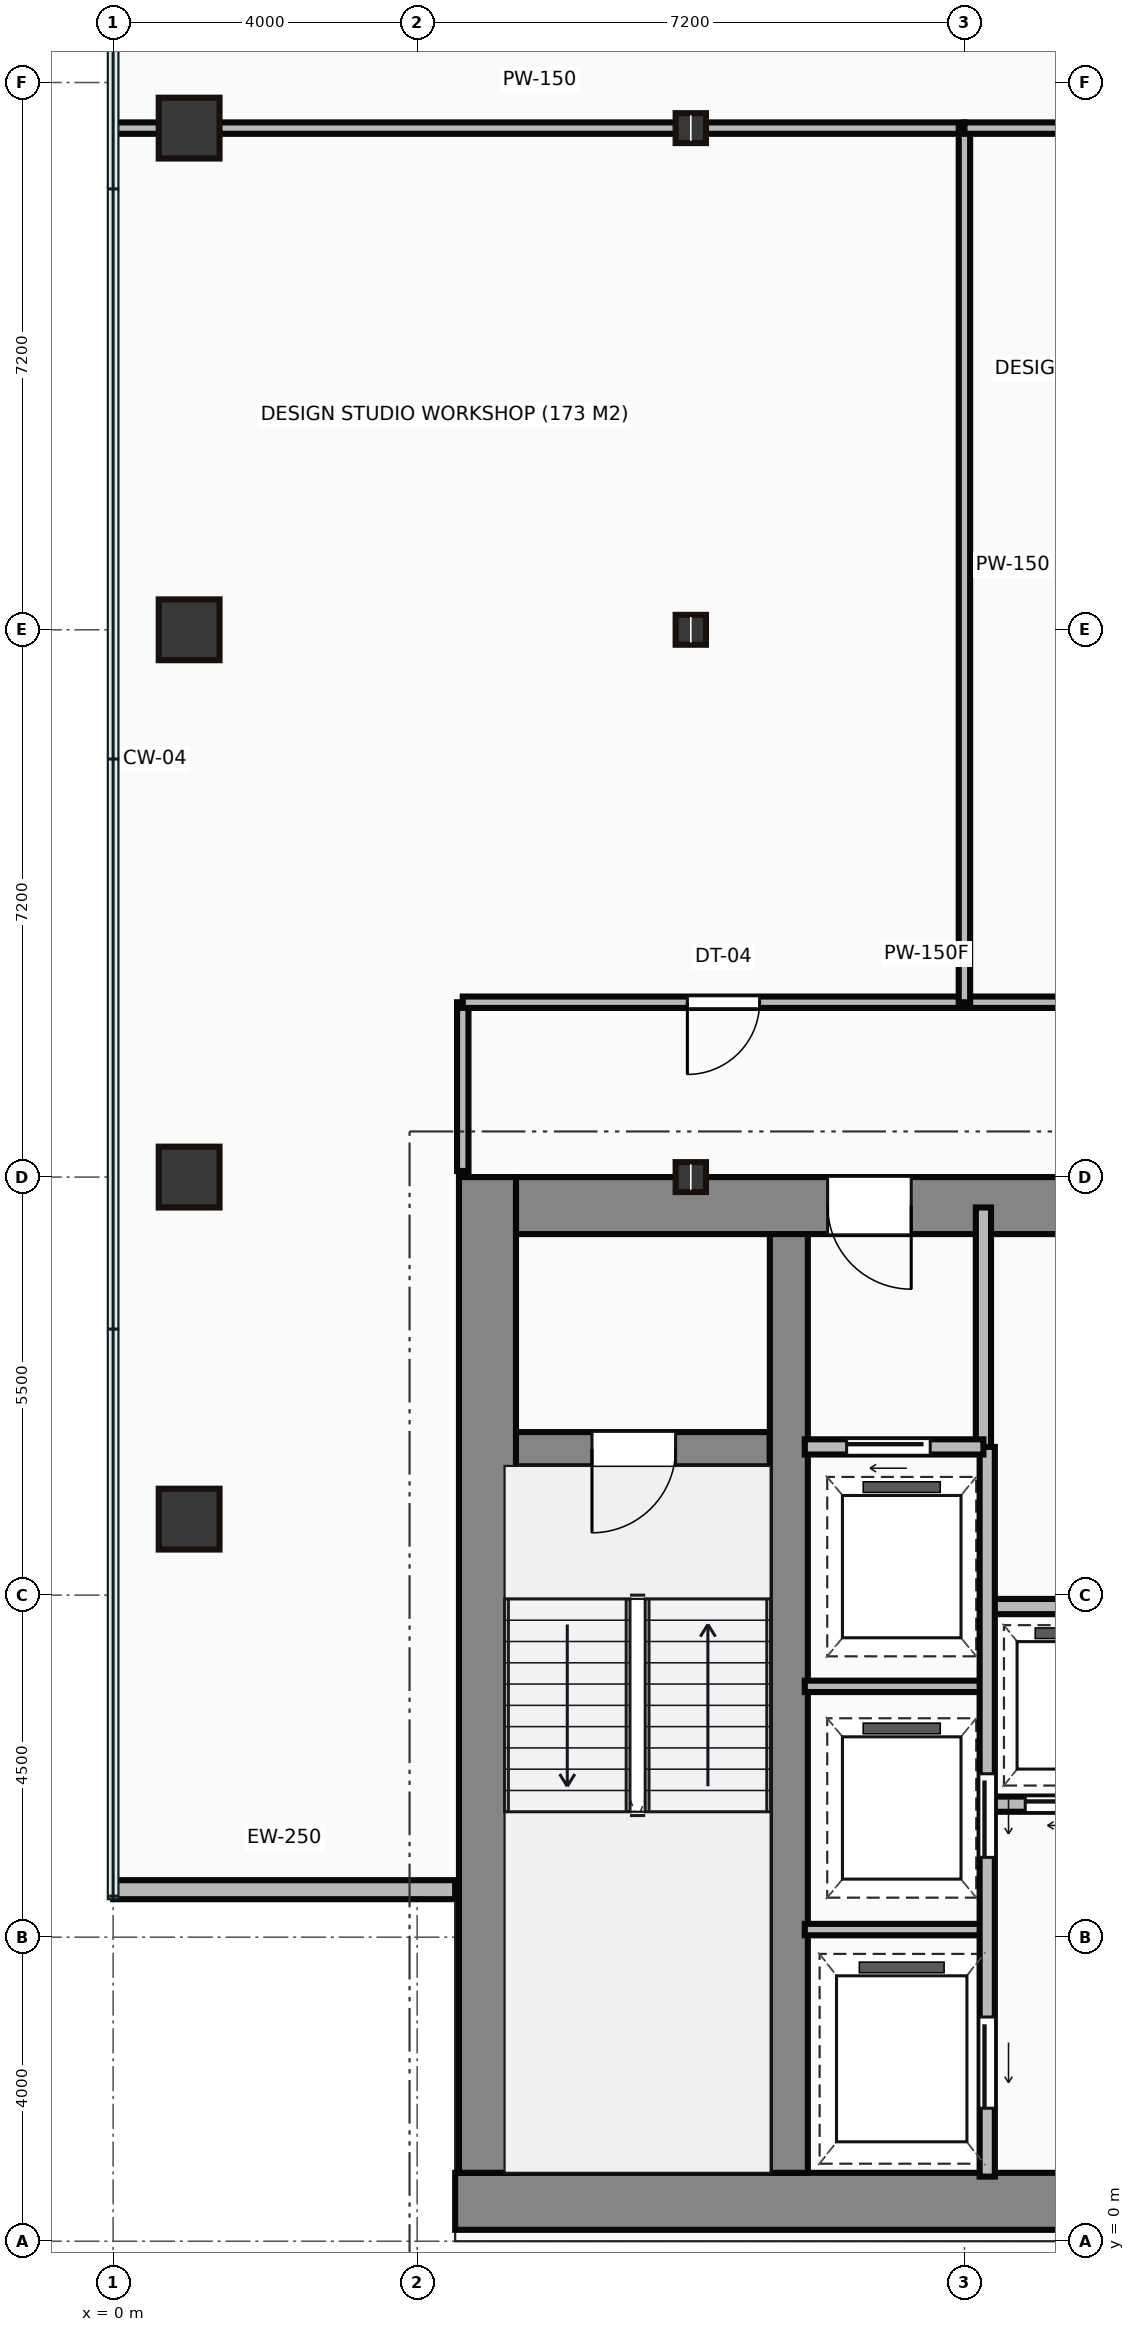
"""IFC4 building model, lengths in metres.
Left out: names, types, materials, properties, quantities, classifications, styles, units other than length and angle.
Written with IfcOpenShell. Run it as: python <this file> out.ifc"""

import sys

from ifc_helpers import new_model, si_unit, direction, frame, frame_2d, origin, origin_2d, place, context, subcontext, project, spatial, rectangle, hollow_rectangle, i_section, extrude, source, transform, mapped, element, fill, save


model = new_model("IFC4")
c1 = context("Model", 3, precision=1e-05, world=origin(), true_north=direction((0.0, 1.0)))
c2 = subcontext(c1, "Body", "Model", "MODEL_VIEW")
j1 = project(units=[si_unit("LENGTHUNIT", "METRE"), si_unit("PLANEANGLEUNIT", "RADIAN")], contexts=[c1])
p1 = place(None, origin())
s1 = spatial("IfcSite", under=j1, at=p1, CompositionType="ELEMENT")
p2 = place(p1, origin())
s2 = spatial("IfcBuilding", under=s1, at=p2, CompositionType="ELEMENT")
p3 = place(p2, frame((0.0, 0.0, 110.55)))
s3 = spatial("IfcBuildingStorey", under=s2, at=p3, CompositionType="ELEMENT", Elevation=110.55)
m1 = source(origin(), c2, "Body", "SweptSolid", [
    extrude(rectangle(XDim=29.5, YDim=0.75, at=frame_2d((14.75, 0.0))), origin(), (0.0, 0.0, 1.0), 3.65),
])
p4 = place(p3, frame((4.5, 0.525, 0.0), z_axis=(0.0, 0.0, 1.0), x_axis=(1.0, 0.0, 0.0)))
e1 = element("IfcWall", 1, at=p4, inside=s3, PredefinedType="SHEAR", context=c2, shape_type="MappedRepresentation", body=[
    mapped(m1, transform((0.0, 0.0, 0.0))),
])
m2 = source(origin(), c2, "Body", "SweptSolid", [
    extrude(rectangle(XDim=13.1, YDim=0.75, at=frame_2d((6.55, 0.0))), origin(), (0.0, 0.0, 1.0), 3.65),
])
p5 = place(p3, frame((4.925, 0.9, 0.0), z_axis=(0.0, 0.0, 1.0), x_axis=(0.0, 1.0, 0.0)))
e2 = element("IfcWall", 2, at=p5, inside=s3, PredefinedType="SHEAR", context=c2, shape_type="MappedRepresentation", body=[
    mapped(m2, transform((0.0, 0.0, 0.0))),
])
m3 = source(origin(), c2, "Body", "SweptSolid", [
    extrude(rectangle(XDim=9.1, YDim=0.75, at=frame_2d((4.55, 0.0))), origin(), (0.0, 0.0, 1.0), 3.65),
])
p6 = place(p3, frame((5.3, 13.625, 0.0), z_axis=(0.0, 0.0, 1.0), x_axis=(1.0, 0.0, 0.0)))
e3 = element("IfcWall", 3, at=p6, inside=s3, PredefinedType="SHEAR", context=c2, shape_type="MappedRepresentation", body=[
    mapped(m3, transform((0.0, 0.0, 0.0))),
])
p7 = place(p6, frame((4.1, 0.0, 0.0)))
e4 = element("IfcOpeningElement", 4, at=p7, cuts=e3, PredefinedType="OPENING", context=c2, shape_type="SweptSolid", body=[
    extrude(rectangle(XDim=1.1, YDim=2.15, at=frame_2d((0.55, 1.075))), frame((0.0, 0.385, 0.0), z_axis=(0.0, -1.0, 0.0), x_axis=(1.0, 0.0, 0.0)), (0.0, 0.0, 1.0), 0.77),
])
m4 = source(origin(), c2, "Body", "SweptSolid", [
    extrude(rectangle(XDim=12.35, YDim=0.5, at=frame_2d((6.175, 0.0))), origin(), (0.0, 0.0, 1.0), 3.65),
])
p8 = place(p3, frame((8.89, 0.9, 0.0), z_axis=(0.0, 0.0, 1.0), x_axis=(0.0, 1.0, 0.0)))
e5 = element("IfcWall", 5, at=p8, inside=s3, PredefinedType="SHEAR", context=c2, shape_type="MappedRepresentation", body=[
    mapped(m4, transform((0.0, 0.0, 0.0))),
])
m5 = source(origin(), c2, "Body", "SweptSolid", [
    extrude(rectangle(XDim=3.39, YDim=0.45, at=frame_2d((1.695, 0.0))), origin(), (0.0, 0.0, 1.0), 3.65),
])
p9 = place(p3, frame((5.25, 10.42, 0.0), z_axis=(0.0, 0.0, 1.0), x_axis=(1.0, 0.0, 0.0)))
e6 = element("IfcWall", 6, at=p9, inside=s3, PredefinedType="SHEAR", context=c2, shape_type="MappedRepresentation", body=[
    mapped(m5, transform((0.0, 0.0, 0.0))),
])
p10 = place(p9, frame((1.05, 0.0, 0.0)))
e7 = element("IfcOpeningElement", 7, at=p10, cuts=e6, PredefinedType="OPENING", context=c2, shape_type="SweptSolid", body=[
    extrude(rectangle(XDim=1.1, YDim=2.15, at=frame_2d((0.55, 1.075))), frame((0.0, 0.235, 0.0), z_axis=(0.0, -1.0, 0.0), x_axis=(1.0, 0.0, 0.0)), (0.0, 0.0, 1.0), 0.47),
])
m6 = source(origin(), c2, "Body", "SweptSolid", [
    extrude(hollow_rectangle(XDim=0.8, YDim=0.8, WallThickness=0.04, at=origin_2d()), origin(), (0.0, 0.0, 1.0), 3.65),
])
for number, where, z_axis, x_axis in (
    (8, (1.0, 9.5, 0.0), (0.0, 0.0, 1.0), (1.0, 0.0, 0.0)),
    (9, (1.0, 14.0, 0.0), (0.0, 0.0, 1.0), (1.0, 0.0, 0.0)),
    (10, (1.0, 21.2, 0.0), (0.0, 0.0, 1.0), (1.0, 0.0, 0.0)),
    (11, (1.0, 27.8, 0.0), (0.0, 0.0, 1.0), (1.0, 0.0, 0.0)),
):
    element("IfcColumn", number, at=place(p3, frame(where, z_axis=z_axis, x_axis=x_axis)), inside=s3, PredefinedType="COLUMN", context=c2, shape_type="MappedRepresentation", body=[
        mapped(m6, transform((0.0, 0.0, 0.0))),
    ])
m7 = source(origin(), c2, "Body", "SweptSolid", [
    extrude(i_section(OverallWidth=0.399, OverallDepth=0.393, WebThickness=0.023, FlangeThickness=0.037, at=origin_2d()), origin(), (0.0, 0.0, 1.0), 3.65),
])
for number, where, z_axis, x_axis in (
    (12, (7.6, 14.0, 0.0), (0.0, 0.0, 1.0), (1.0, 0.0, 0.0)),
    (13, (7.6, 21.2, 0.0), (0.0, 0.0, 1.0), (1.0, 0.0, 0.0)),
    (14, (7.6, 27.8, 0.0), (0.0, 0.0, 1.0), (1.0, 0.0, 0.0)),
):
    element("IfcColumn", number, at=place(p3, frame(where, z_axis=z_axis, x_axis=x_axis)), inside=s3, PredefinedType="COLUMN", context=c2, shape_type="MappedRepresentation", body=[
        mapped(m7, transform((0.0, 0.0, 0.0))),
    ])
m8 = source(origin(), c2, "Body", "SweptSolid", [
    extrude(rectangle(XDim=4.5, YDim=0.25, at=frame_2d((2.25, 0.0))), origin(), (0.0, 0.0, 1.0), 3.4),
])
p11 = place(p3, frame((0.0, 4.625, 0.0), z_axis=(0.0, 0.0, 1.0), x_axis=(1.0, 0.0, 0.0)))
e15 = element("IfcWall", 15, at=p11, inside=s3, PredefinedType="STANDARD", context=c2, shape_type="MappedRepresentation", body=[
    mapped(m8, transform((0.0, 0.0, 0.0))),
])
m9 = source(origin(), c2, "Body", "SweptSolid", [
    extrude(rectangle(XDim=3.18, YDim=0.2, at=frame_2d((1.59, 0.0))), origin(), (0.0, 0.0, 1.0), 3.4),
])
p12 = place(p3, frame((11.45, 10.42, 0.0), z_axis=(0.0, 0.0, 1.0), x_axis=(0.0, 1.0, 0.0)))
e16 = element("IfcWall", 16, at=p12, inside=s3, PredefinedType="PARTITIONING", context=c2, shape_type="MappedRepresentation", body=[
    mapped(m9, transform((0.0, 0.0, 0.0))),
])
m10 = source(origin(), c2, "Body", "SweptSolid", [
    extrude(rectangle(XDim=2.35, YDim=0.2, at=frame_2d((1.175, 0.0))), origin(), (0.0, 0.0, 1.0), 3.4),
])
p13 = place(p3, frame((9.1, 10.45, 0.0), z_axis=(0.0, 0.0, 1.0), x_axis=(1.0, 0.0, 0.0)))
e17 = element("IfcWall", 17, at=p13, inside=s3, PredefinedType="PARTITIONING", context=c2, shape_type="MappedRepresentation", body=[
    mapped(m10, transform((0.0, 0.0, 0.0))),
])
p14 = place(p13, frame((0.55, 0.0, 0.0)))
e18 = element("IfcOpeningElement", 18, at=p14, cuts=e17, PredefinedType="OPENING", context=c2, shape_type="SweptSolid", body=[
    extrude(rectangle(XDim=1.1, YDim=2.15, at=frame_2d((0.55, 1.075))), frame((0.0, 0.11, 0.0), z_axis=(0.0, -1.0, 0.0), x_axis=(1.0, 0.0, 0.0)), (0.0, 0.0, 1.0), 0.22),
])
m11 = source(origin(), c2, "Body", "SweptSolid", [
    extrude(rectangle(XDim=9.6, YDim=0.2, at=frame_2d((4.8, 0.0))), origin(), (0.0, 0.0, 1.0), 3.4),
])
p15 = place(p3, frame((11.5, 0.85, 0.0), z_axis=(0.0, 0.0, 1.0), x_axis=(0.0, 1.0, 0.0)))
e19 = element("IfcWall", 19, at=p15, inside=s3, PredefinedType="PARTITIONING", context=c2, shape_type="MappedRepresentation", body=[
    mapped(m11, transform((0.0, 0.0, 0.0))),
])
p16 = place(p15, frame((4.2, 0.0, 0.0)))
e20 = element("IfcOpeningElement", 20, at=p16, cuts=e19, PredefinedType="OPENING", context=c2, shape_type="SweptSolid", body=[
    extrude(rectangle(XDim=1.1, YDim=2.15, at=frame_2d((0.55, 1.075))), frame((0.0, 0.11, 0.0), z_axis=(0.0, -1.0, 0.0), x_axis=(1.0, 0.0, 0.0)), (0.0, 0.0, 1.0), 0.22),
])
p17 = place(p15, frame((0.9, 0.0, 0.0)))
e21 = element("IfcOpeningElement", 21, at=p17, cuts=e19, PredefinedType="OPENING", context=c2, shape_type="SweptSolid", body=[
    extrude(rectangle(XDim=1.2, YDim=2.15, at=frame_2d((0.6, 1.075))), frame((0.0, 0.11, 0.0), z_axis=(0.0, -1.0, 0.0), x_axis=(1.0, 0.0, 0.0)), (0.0, 0.0, 1.0), 0.22),
])
m12 = source(origin(), c2, "Body", "SweptSolid", [
    extrude(rectangle(XDim=2.4, YDim=0.15, at=frame_2d((1.2, 0.0))), origin(), (0.0, 0.0, 1.0), 3.4),
])
for number, where, z_axis, x_axis in (
    (22, (9.1, 4.1, 0.0), (0.0, 0.0, 1.0), (1.0, 0.0, 0.0)),
    (23, (9.1, 7.3, 0.0), (0.0, 0.0, 1.0), (1.0, 0.0, 0.0)),
):
    element("IfcWall", number, at=place(p3, frame(where, z_axis=z_axis, x_axis=x_axis)), inside=s3, PredefinedType="PARTITIONING", context=c2, shape_type="MappedRepresentation", body=[
        mapped(m12, transform((0.0, 0.0, 0.0))),
    ])
m13 = source(origin(), c2, "Body", "SweptSolid", [
    extrude(rectangle(XDim=11.85, YDim=0.2, at=frame_2d((5.925, 0.0))), origin(), (0.0, 0.0, 1.0), 3.4),
])
p18 = place(p3, frame((11.55, 5.75, 0.0), z_axis=(0.0, 0.0, 1.0), x_axis=(1.0, 0.0, 0.0)))
e24 = element("IfcWall", 24, at=p18, inside=s3, PredefinedType="PARTITIONING", context=c2, shape_type="MappedRepresentation", body=[
    mapped(m13, transform((0.0, 0.0, 0.0))),
])
p19 = place(p18, frame((0.45, 0.0, 0.0)))
e25 = element("IfcOpeningElement", 25, at=p19, cuts=e24, PredefinedType="OPENING", context=c2, shape_type="SweptSolid", body=[
    extrude(rectangle(XDim=1.05, YDim=2.15, at=frame_2d((0.525, 1.075))), frame((0.0, 0.11, 0.0), z_axis=(0.0, -1.0, 0.0), x_axis=(1.0, 0.0, 0.0)), (0.0, 0.0, 1.0), 0.22),
])
p20 = place(p18, frame((2.4, 0.0, 0.0)))
e26 = element("IfcOpeningElement", 26, at=p20, cuts=e24, PredefinedType="OPENING", context=c2, shape_type="SweptSolid", body=[
    extrude(rectangle(XDim=1.05, YDim=2.15, at=frame_2d((0.525, 1.075))), frame((0.0, 0.11, 0.0), z_axis=(0.0, -1.0, 0.0), x_axis=(1.0, 0.0, 0.0)), (0.0, 0.0, 1.0), 0.22),
])
p21 = place(p18, frame((4.35, 0.0, 0.0)))
e27 = element("IfcOpeningElement", 27, at=p21, cuts=e24, PredefinedType="OPENING", context=c2, shape_type="SweptSolid", body=[
    extrude(rectangle(XDim=1.05, YDim=2.15, at=frame_2d((0.525, 1.075))), frame((0.0, 0.11, 0.0), z_axis=(0.0, -1.0, 0.0), x_axis=(1.0, 0.0, 0.0)), (0.0, 0.0, 1.0), 0.22),
])
p22 = place(p18, frame((6.3, 0.0, 0.0)))
e28 = element("IfcOpeningElement", 28, at=p22, cuts=e24, PredefinedType="OPENING", context=c2, shape_type="SweptSolid", body=[
    extrude(rectangle(XDim=1.05, YDim=2.15, at=frame_2d((0.525, 1.075))), frame((0.0, 0.11, 0.0), z_axis=(0.0, -1.0, 0.0), x_axis=(1.0, 0.0, 0.0)), (0.0, 0.0, 1.0), 0.22),
])
p23 = place(p18, frame((8.25, 0.0, 0.0)))
e29 = element("IfcOpeningElement", 29, at=p23, cuts=e24, PredefinedType="OPENING", context=c2, shape_type="SweptSolid", body=[
    extrude(rectangle(XDim=1.05, YDim=2.15, at=frame_2d((0.525, 1.075))), frame((0.0, 0.11, 0.0), z_axis=(0.0, -1.0, 0.0), x_axis=(1.0, 0.0, 0.0)), (0.0, 0.0, 1.0), 0.22),
])
p24 = place(p18, frame((10.2, 0.0, 0.0)))
e30 = element("IfcOpeningElement", 30, at=p24, cuts=e24, PredefinedType="OPENING", context=c2, shape_type="SweptSolid", body=[
    extrude(rectangle(XDim=1.05, YDim=2.15, at=frame_2d((0.525, 1.075))), frame((0.0, 0.11, 0.0), z_axis=(0.0, -1.0, 0.0), x_axis=(1.0, 0.0, 0.0)), (0.0, 0.0, 1.0), 0.22),
])
p25 = place(p3, frame((11.55, 8.35, 0.0), z_axis=(0.0, 0.0, 1.0), x_axis=(1.0, 0.0, 0.0)))
e31 = element("IfcWall", 31, at=p25, inside=s3, PredefinedType="PARTITIONING", context=c2, shape_type="MappedRepresentation", body=[
    mapped(m13, transform((0.0, 0.0, 0.0))),
])
m14 = source(origin(), c2, "Body", "SweptSolid", [
    extrude(rectangle(XDim=2.22, YDim=0.15, at=frame_2d((1.11, 0.0))), origin(), (0.0, 0.0, 1.0), 3.4),
])
p26 = place(p3, frame((4.6, 14.08, 0.0), z_axis=(0.0, 0.0, 1.0), x_axis=(0.0, 1.0, 0.0)))
e32 = element("IfcWall", 32, at=p26, inside=s3, PredefinedType="PARTITIONING", context=c2, shape_type="MappedRepresentation", body=[
    mapped(m14, transform((0.0, 0.0, 0.0))),
])
m15 = source(origin(), c2, "Body", "SweptSolid", [
    extrude(rectangle(XDim=12.2, YDim=0.15, at=frame_2d((6.1, 0.0))), origin(), (0.0, 0.0, 1.0), 3.4),
])
p27 = place(p3, frame((4.6, 16.3, 0.0), z_axis=(0.0, 0.0, 1.0), x_axis=(1.0, 0.0, 0.0)))
e33 = element("IfcWall", 33, at=p27, inside=s3, PredefinedType="PARTITIONING", context=c2, shape_type="MappedRepresentation", body=[
    mapped(m15, transform((0.0, 0.0, 0.0))),
])
p28 = place(p27, frame((2.955, 0.0, 0.0)))
e34 = element("IfcOpeningElement", 34, at=p28, cuts=e33, PredefinedType="OPENING", context=c2, shape_type="SweptSolid", body=[
    extrude(rectangle(XDim=0.95, YDim=2.15, at=frame_2d((0.475, 1.075))), frame((0.0, 0.085, 0.0), z_axis=(0.0, -1.0, 0.0), x_axis=(1.0, 0.0, 0.0)), (0.0, 0.0, 1.0), 0.17),
])
m16 = source(origin(), c2, "Body", "SweptSolid", [
    extrude(rectangle(XDim=11.18, YDim=0.15, at=frame_2d((5.59, 0.0))), origin(), (0.0, 0.0, 1.0), 2.702),
])
p29 = place(p3, frame((0.02, 27.8, 0.0), z_axis=(0.0, 0.0, 1.0), x_axis=(1.0, 0.0, 0.0)))
e35 = element("IfcWall", 35, at=p29, inside=s3, PredefinedType="PARTITIONING", context=c2, shape_type="MappedRepresentation", body=[
    mapped(m16, transform((0.0, 0.0, 0.0))),
])
m17 = source(origin(), c2, "Body", "SweptSolid", [
    extrude(rectangle(XDim=11.5, YDim=0.15, at=frame_2d((5.75, 0.0))), origin(), (0.0, 0.0, 1.0), 3.4),
])
p30 = place(p3, frame((11.2, 27.8, 0.0), z_axis=(0.0, 0.0, 1.0), x_axis=(0.0, -1.0, 0.0)))
e36 = element("IfcWall", 36, at=p30, inside=s3, PredefinedType="PARTITIONING", context=c2, shape_type="MappedRepresentation", body=[
    mapped(m17, transform((0.0, 0.0, 0.0))),
])
m18 = source(origin(), c2, "Body", "SweptSolid", [
    extrude(rectangle(XDim=5.6, YDim=0.15, at=frame_2d((2.8, 0.0))), origin(), (0.0, 0.0, 1.0), 2.702),
])
p31 = place(p3, frame((16.8, 27.8, 0.0), z_axis=(0.0, 0.0, 1.0), x_axis=(-1.0, 0.0, 0.0)))
e37 = element("IfcWall", 37, at=p31, inside=s3, PredefinedType="PARTITIONING", context=c2, shape_type="MappedRepresentation", body=[
    mapped(m18, transform((0.0, 0.0, 0.0))),
])
m19 = source(origin(), c2, "Body", "SweptSolid", [
    extrude(rectangle(XDim=1.1, YDim=2.15, at=frame_2d((0.55, 1.075))), frame((0.0, 0.025, 0.0), z_axis=(0.0, -1.0, 0.0), x_axis=(1.0, 0.0, 0.0)), (0.0, 0.0, 1.0), 0.05),
])
p32 = place(p10, frame((1.1, 0.0, 0.0), z_axis=(0.0, 0.0, 1.0), x_axis=(-1.0, 0.0, 0.0)))
e38 = element("IfcDoor", 38, at=p32, inside=s3, OperationType="SINGLE_SWING_LEFT", PredefinedType="DOOR", context=c2, shape_type="MappedRepresentation", body=[
    mapped(m19, transform((0.0, 0.0, 0.0))),
])
fill(e7, e38)
p33 = place(p7, origin())
e39 = element("IfcDoor", 39, at=p33, inside=s3, OperationType="SINGLE_SWING_RIGHT", PredefinedType="DOOR", context=c2, shape_type="MappedRepresentation", body=[
    mapped(m19, transform((0.0, 0.0, 0.0))),
])
fill(e4, e39)
p34 = place(p14, origin())
e40 = element("IfcDoor", 40, at=p34, inside=s3, OperationType="SLIDING_TO_LEFT", PredefinedType="DOOR", context=c2, shape_type="MappedRepresentation", body=[
    mapped(m19, transform((0.0, 0.0, 0.0))),
])
fill(e18, e40)
p35 = place(p16, frame((1.1, 0.0, 0.0), z_axis=(0.0, 0.0, 1.0), x_axis=(-1.0, 0.0, 0.0)))
e41 = element("IfcDoor", 41, at=p35, inside=s3, OperationType="SLIDING_TO_LEFT", PredefinedType="DOOR", context=c2, shape_type="MappedRepresentation", body=[
    mapped(m19, transform((0.0, 0.0, 0.0))),
])
fill(e20, e41)
m20 = source(origin(), c2, "Body", "SweptSolid", [
    extrude(rectangle(XDim=1.2, YDim=2.15, at=frame_2d((0.6, 1.075))), frame((0.0, 0.025, 0.0), z_axis=(0.0, -1.0, 0.0), x_axis=(1.0, 0.0, 0.0)), (0.0, 0.0, 1.0), 0.05),
])
p36 = place(p17, frame((1.2, 0.0, 0.0), z_axis=(0.0, 0.0, 1.0), x_axis=(-1.0, 0.0, 0.0)))
e42 = element("IfcDoor", 42, at=p36, inside=s3, OperationType="SLIDING_TO_LEFT", PredefinedType="DOOR", context=c2, shape_type="MappedRepresentation", body=[
    mapped(m20, transform((0.0, 0.0, 0.0))),
])
fill(e21, e42)
m21 = source(origin(), c2, "Body", "SweptSolid", [
    extrude(rectangle(XDim=1.05, YDim=2.15, at=frame_2d((0.525, 1.075))), frame((0.0, 0.025, 0.0), z_axis=(0.0, -1.0, 0.0), x_axis=(1.0, 0.0, 0.0)), (0.0, 0.0, 1.0), 0.05),
])
p37 = place(p19, frame((1.05, 0.0, 0.0), z_axis=(0.0, 0.0, 1.0), x_axis=(-1.0, 0.0, 0.0)))
e43 = element("IfcDoor", 43, at=p37, inside=s3, OperationType="SLIDING_TO_LEFT", PredefinedType="DOOR", context=c2, shape_type="MappedRepresentation", body=[
    mapped(m21, transform((0.0, 0.0, 0.0))),
])
fill(e25, e43)
m22 = source(origin(), c2, "Body", "SweptSolid", [
    extrude(rectangle(XDim=0.95, YDim=2.15, at=frame_2d((0.475, 1.075))), frame((0.0, 0.025, 0.0), z_axis=(0.0, -1.0, 0.0), x_axis=(1.0, 0.0, 0.0)), (0.0, 0.0, 1.0), 0.05),
])
p38 = place(p28, origin())
e44 = element("IfcDoor", 44, at=p38, inside=s3, OperationType="SINGLE_SWING_LEFT", PredefinedType="DOOR", context=c2, shape_type="MappedRepresentation", body=[
    mapped(m22, transform((0.0, 0.0, 0.0))),
])
fill(e34, e44)
save(model, sys.argv[1])
